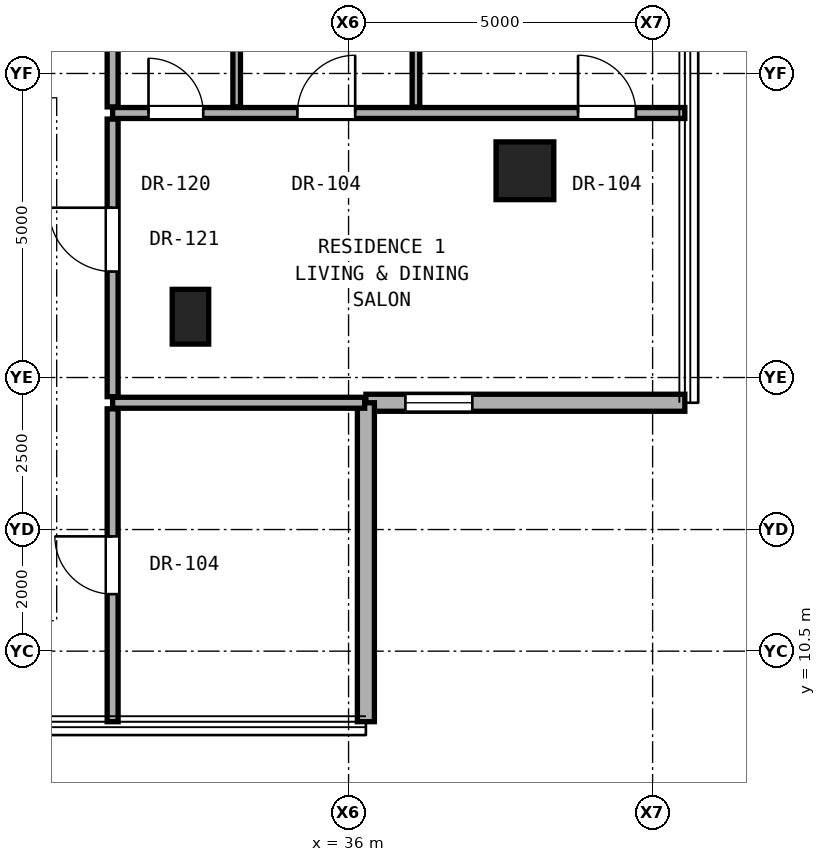
"""IFC4 building model, lengths in metres.
Left out: names, types, materials, properties, quantities, classifications, styles, units other than length and angle.
Written with IfcOpenShell. Run it as: python <this file> out.ifc"""

import sys

from ifc_helpers import new_model, si_unit, direction, frame, frame_2d, origin, origin_2d, place, context, subcontext, project, spatial, rectangle, hollow_rectangle, extrude, element, fill, save


model = new_model("IFC4")
c1 = context("Model", 3, precision=1e-05, world=origin(), true_north=direction((0.0, 1.0)))
c2 = subcontext(c1, "Body", "Model", "MODEL_VIEW")
j1 = project(units=[si_unit("LENGTHUNIT", "METRE"), si_unit("PLANEANGLEUNIT", "RADIAN")], contexts=[c1])
p1 = place(None, origin())
s1 = spatial("IfcSite", under=j1, at=p1, CompositionType="ELEMENT")
p2 = place(p1, origin())
s2 = spatial("IfcBuilding", under=s1, at=p2, CompositionType="ELEMENT")
p3 = place(p2, frame((0.0, 0.0, 170.65)))
s3 = spatial("IfcBuildingStorey", under=s2, at=p3, CompositionType="ELEMENT", Elevation=170.65)
p4 = place(p3, frame((38.9, 18.4, 0.0), z_axis=(0.0, 0.0, 1.0), x_axis=(1.0, 0.0, 0.0)))
e1 = element("IfcColumn", 1, at=p4, inside=s3, PredefinedType="COLUMN", context=c2, shape_type="SweptSolid", body=[
    extrude(hollow_rectangle(XDim=0.95, YDim=0.95, WallThickness=0.05, at=origin_2d()), origin(), (0.0, 0.0, 1.0), 3.25),
])
p5 = place(p3, frame((33.4, 16.0, 0.0), z_axis=(0.0, 0.0, 1.0), x_axis=(1.0, 0.0, 0.0)))
e2 = element("IfcColumn", 2, at=p5, inside=s3, PredefinedType="PILASTER", context=c2, shape_type="SweptSolid", body=[
    extrude(rectangle(XDim=0.6, YDim=0.9, at=origin_2d()), origin(), (0.0, 0.0, 1.0), 3.25),
])
p6 = place(p3, frame((36.285, 14.585, 0.0), z_axis=(0.0, 0.0, 1.0), x_axis=(1.0, 0.0, 0.0)))
e3 = element("IfcWall", 3, at=p6, inside=s3, PredefinedType="SOLIDWALL", context=c2, shape_type="SweptSolid", body=[
    extrude(rectangle(XDim=5.245, YDim=0.28, at=frame_2d((2.623, 0.0))), origin(), (0.0, 0.0, 1.0), 3.03),
])
p7 = place(p6, frame((0.65, 0.0, 0.85)))
e4 = element("IfcOpeningElement", 4, at=p7, cuts=e3, PredefinedType="OPENING", context=c2, shape_type="SweptSolid", body=[
    extrude(rectangle(XDim=1.1, YDim=2.0, at=frame_2d((0.55, 1.0))), frame((0.0, 0.15, 0.0), z_axis=(0.0, -1.0, 0.0), x_axis=(1.0, 0.0, 0.0)), (0.0, 0.0, 1.0), 0.3),
])
p8 = place(p3, frame((36.285, 9.34, 0.0), z_axis=(0.0, 0.0, 1.0), x_axis=(0.0, 1.0, 0.0)))
e5 = element("IfcWall", 5, at=p8, inside=s3, PredefinedType="SOLIDWALL", context=c2, shape_type="SweptSolid", body=[
    extrude(rectangle(XDim=5.245, YDim=0.28, at=frame_2d((2.623, 0.0))), origin(), (0.0, 0.0, 1.0), 3.03),
])
p9 = place(p3, frame((32.12, 14.585, 0.0), z_axis=(0.0, 0.0, 1.0), x_axis=(1.0, 0.0, 0.0)))
e6 = element("IfcWall", 6, at=p9, inside=s3, PredefinedType="PARTITIONING", context=c2, shape_type="SweptSolid", body=[
    extrude(rectangle(XDim=4.145, YDim=0.18, at=frame_2d((2.072, 0.0))), origin(), (0.0, 0.0, 1.0), 3.05),
])
p10 = place(p3, frame((32.12, 19.35, 0.0), z_axis=(0.0, 0.0, 1.0), x_axis=(1.0, 0.0, 0.0)))
e7 = element("IfcWall", 7, at=p10, inside=s3, PredefinedType="PARTITIONING", context=c2, shape_type="SweptSolid", body=[
    extrude(rectangle(XDim=9.41, YDim=0.18, at=frame_2d((4.705, 0.0))), origin(), (0.0, 0.0, 1.0), 2.269),
])
p11 = place(p10, frame((7.654, 0.0, 0.0)))
e8 = element("IfcOpeningElement", 8, at=p11, cuts=e7, PredefinedType="OPENING", context=c2, shape_type="SweptSolid", body=[
    extrude(rectangle(XDim=0.95, YDim=2.15, at=frame_2d((0.475, 1.075))), frame((0.0, 0.1, 0.0), z_axis=(0.0, -1.0, 0.0), x_axis=(1.0, 0.0, 0.0)), (0.0, 0.0, 1.0), 0.2),
])
p12 = place(p10, frame((3.039, 0.0, 0.0)))
e9 = element("IfcOpeningElement", 9, at=p12, cuts=e7, PredefinedType="OPENING", context=c2, shape_type="SweptSolid", body=[
    extrude(rectangle(XDim=0.95, YDim=2.15, at=frame_2d((0.475, 1.075))), frame((0.0, 0.1, 0.0), z_axis=(0.0, -1.0, 0.0), x_axis=(1.0, 0.0, 0.0)), (0.0, 0.0, 1.0), 0.2),
])
p13 = place(p10, frame((0.59, 0.0, 0.0)))
e10 = element("IfcOpeningElement", 10, at=p13, cuts=e7, PredefinedType="OPENING", context=c2, shape_type="SweptSolid", body=[
    extrude(rectangle(XDim=0.9, YDim=2.1, at=frame_2d((0.45, 1.05))), frame((0.0, 0.1, 0.0), z_axis=(0.0, -1.0, 0.0), x_axis=(1.0, 0.0, 0.0)), (0.0, 0.0, 1.0), 0.2),
])
p14 = place(p3, frame((32.12, 9.34, 0.0), z_axis=(0.0, 0.0, 1.0), x_axis=(0.0, 1.0, 0.0)))
e11 = element("IfcWall", 11, at=p14, inside=s3, PredefinedType="PARTITIONING", context=c2, shape_type="SweptSolid", body=[
    extrude(rectangle(XDim=5.145, YDim=0.18, at=frame_2d((2.573, 0.0))), origin(), (0.0, 0.0, 1.0), 3.05),
])
p15 = place(p14, frame((2.097, 0.0, 0.0)))
e12 = element("IfcOpeningElement", 12, at=p15, cuts=e11, PredefinedType="OPENING", context=c2, shape_type="SweptSolid", body=[
    extrude(rectangle(XDim=0.95, YDim=2.15, at=frame_2d((0.475, 1.075))), frame((0.0, 0.1, 0.0), z_axis=(0.0, -1.0, 0.0), x_axis=(1.0, 0.0, 0.0)), (0.0, 0.0, 1.0), 0.2),
])
p16 = place(p3, frame((32.12, 14.685, 0.0), z_axis=(0.0, 0.0, 1.0), x_axis=(0.0, 1.0, 0.0)))
e13 = element("IfcWall", 13, at=p16, inside=s3, PredefinedType="PARTITIONING", context=c2, shape_type="SweptSolid", body=[
    extrude(rectangle(XDim=4.565, YDim=0.18, at=frame_2d((2.282, 0.0))), origin(), (0.0, 0.0, 1.0), 2.442),
])
p17 = place(p16, frame((2.058, 0.0, 0.0)))
e14 = element("IfcOpeningElement", 14, at=p17, cuts=e13, PredefinedType="OPENING", context=c2, shape_type="SweptSolid", body=[
    extrude(rectangle(XDim=1.05, YDim=2.2, at=frame_2d((0.525, 1.1))), frame((0.0, 0.1, 0.0), z_axis=(0.0, -1.0, 0.0), x_axis=(1.0, 0.0, 0.0)), (0.0, 0.0, 1.0), 0.2),
])
p18 = place(p3, frame((32.12, 19.45, 0.0), z_axis=(0.0, 0.0, 1.0), x_axis=(0.0, 1.0, 0.0)))
e15 = element("IfcWall", 15, at=p18, inside=s3, PredefinedType="PARTITIONING", context=c2, shape_type="SweptSolid", body=[
    extrude(rectangle(XDim=2.52, YDim=0.18, at=frame_2d((1.26, 0.0))), origin(), (0.0, 0.0, 1.0), 3.05),
])
for number, where, z_axis, x_axis in (
    (16, (34.16, 19.45, 0.0), (0.0, 0.0, 1.0), (0.0, 1.0, 0.0)),
    (17, (37.108, 19.45, 0.0), (0.0, 0.0, 1.0), (0.0, 1.0, 0.0)),
):
    element("IfcWall", number, at=place(p3, frame(where, z_axis=z_axis, x_axis=x_axis)), inside=s3, PredefinedType="PARTITIONING", context=c2, shape_type="SweptSolid", body=[
        extrude(rectangle(XDim=2.52, YDim=0.125, at=frame_2d((1.26, 0.0))), origin(), (0.0, 0.0, 1.0), 3.05),
    ])
p19 = place(p7, origin())
e18 = element("IfcWindow", 18, at=p19, inside=s3, PartitioningType="SINGLE_PANEL", PredefinedType="WINDOW", context=c2, shape_type="SweptSolid", body=[
    extrude(rectangle(XDim=1.1, YDim=2.0, at=frame_2d((0.55, 1.0))), frame((0.0, 0.03, 0.0), z_axis=(0.0, -1.0, 0.0), x_axis=(1.0, 0.0, 0.0)), (0.0, 0.0, 1.0), 0.06),
])
fill(e4, e18)
p20 = place(p17, origin())
e19 = element("IfcDoor", 19, at=p20, inside=s3, OperationType="SINGLE_SWING_RIGHT", PredefinedType="DOOR", context=c2, shape_type="SweptSolid", body=[
    extrude(rectangle(XDim=1.05, YDim=2.2, at=frame_2d((0.525, 1.1))), frame((0.0, 0.025, 0.0), z_axis=(0.0, -1.0, 0.0), x_axis=(1.0, 0.0, 0.0)), (0.0, 0.0, 1.0), 0.05),
])
fill(e14, e19)
p21 = place(p11, origin())
e20 = element("IfcDoor", 20, at=p21, inside=s3, OperationType="SINGLE_SWING_LEFT", PredefinedType="DOOR", context=c2, shape_type="SweptSolid", body=[
    extrude(rectangle(XDim=0.95, YDim=2.15, at=frame_2d((0.475, 1.075))), frame((0.0, 0.025, 0.0), z_axis=(0.0, -1.0, 0.0), x_axis=(1.0, 0.0, 0.0)), (0.0, 0.0, 1.0), 0.05),
])
fill(e8, e20)
p22 = place(p12, origin())
e21 = element("IfcDoor", 21, at=p22, inside=s3, OperationType="SINGLE_SWING_RIGHT", PredefinedType="DOOR", context=c2, shape_type="SweptSolid", body=[
    extrude(rectangle(XDim=0.95, YDim=2.15, at=frame_2d((0.475, 1.075))), frame((0.0, 0.025, 0.0), z_axis=(0.0, -1.0, 0.0), x_axis=(1.0, 0.0, 0.0)), (0.0, 0.0, 1.0), 0.05),
])
fill(e9, e21)
p23 = place(p13, origin())
e22 = element("IfcDoor", 22, at=p23, inside=s3, OperationType="SINGLE_SWING_LEFT", PredefinedType="DOOR", context=c2, shape_type="SweptSolid", body=[
    extrude(rectangle(XDim=0.9, YDim=2.1, at=frame_2d((0.45, 1.05))), frame((0.0, 0.025, 0.0), z_axis=(0.0, -1.0, 0.0), x_axis=(1.0, 0.0, 0.0)), (0.0, 0.0, 1.0), 0.05),
])
fill(e10, e22)
p24 = place(p15, origin())
e23 = element("IfcDoor", 23, at=p24, inside=s3, OperationType="SINGLE_SWING_RIGHT", PredefinedType="DOOR", context=c2, shape_type="SweptSolid", body=[
    extrude(rectangle(XDim=0.95, YDim=2.15, at=frame_2d((0.475, 1.075))), frame((0.0, 0.025, 0.0), z_axis=(0.0, -1.0, 0.0), x_axis=(1.0, 0.0, 0.0)), (0.0, 0.0, 1.0), 0.05),
])
fill(e12, e23)
save(model, sys.argv[1])
